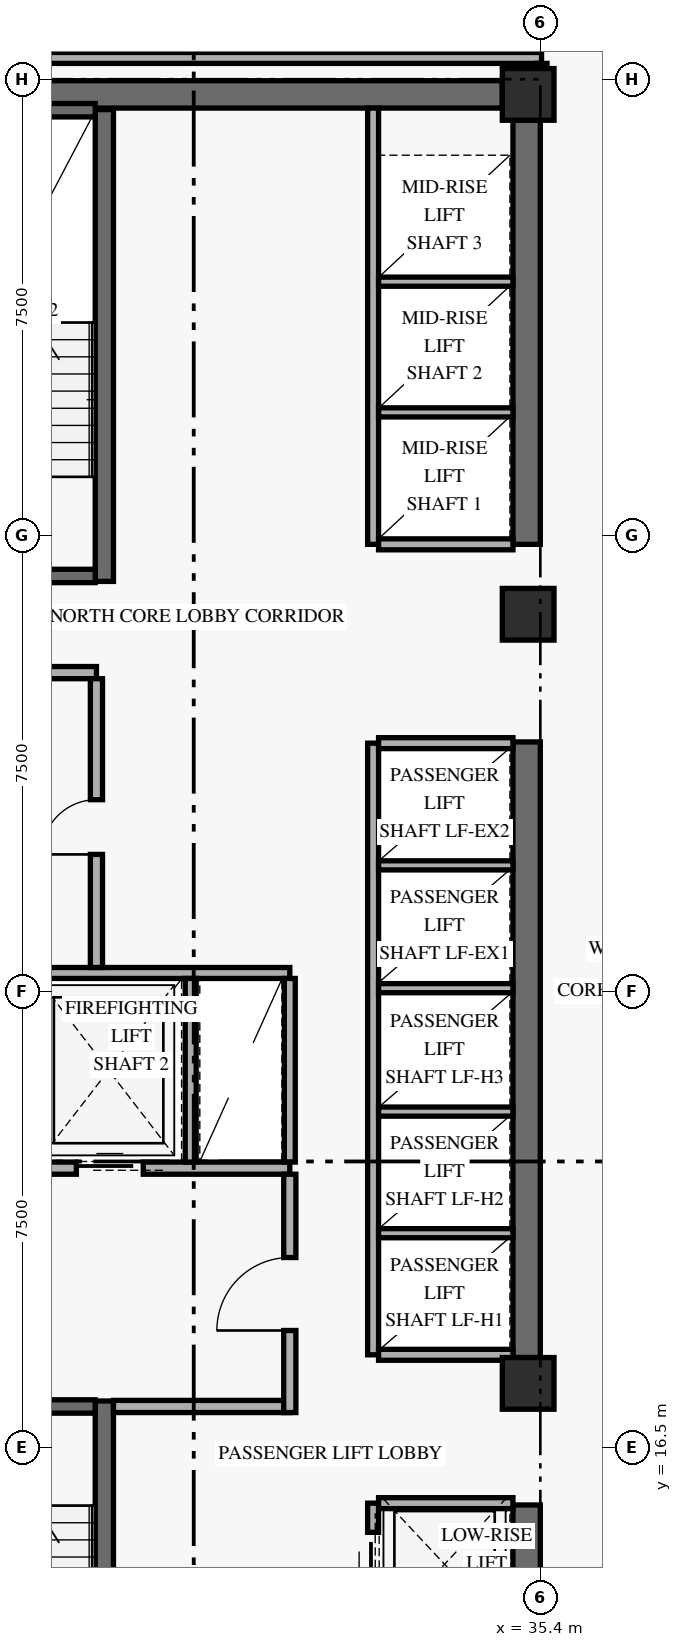
"""IFC4 building model, lengths in metres.
Left out: names, types, materials, properties, quantities, classifications, styles, units other than length and angle.
Written with IfcOpenShell. Run it as: python <this file> out.ifc"""

import sys

from ifc_helpers import new_model, si_unit, direction, frame, frame_2d, origin, origin_2d, place, context, subcontext, project, spatial, rectangle, extrude, element, fill, save


model = new_model("IFC4")
c1 = context("Model", 3, precision=1e-05, world=origin(), true_north=direction((0.0, 1.0)))
c2 = subcontext(c1, "Body", "Model", "MODEL_VIEW")
j1 = project(units=[si_unit("LENGTHUNIT", "METRE"), si_unit("PLANEANGLEUNIT", "RADIAN")], contexts=[c1])
p1 = place(None, origin())
s1 = spatial("IfcSite", under=j1, at=p1, CompositionType="ELEMENT")
p2 = place(p1, origin())
s2 = spatial("IfcBuilding", under=s1, at=p2, CompositionType="ELEMENT")
p3 = place(p2, frame((0.0, 0.0, 56.4)))
s3 = spatial("IfcBuildingStorey", under=s2, at=p3, CompositionType="ELEMENT", Elevation=56.4)
p4 = place(p3, frame((35.175, 9.675, 0.0), z_axis=(0.0, 0.0, 1.0), x_axis=(0.0, 1.0, 0.0)))
e1 = element("IfcWall", 1, at=p4, inside=s3, PredefinedType="SHEAR", context=c2, shape_type="SweptSolid", body=[
    extrude(rectangle(XDim=5.875, YDim=0.45, at=frame_2d((2.938, 0.0))), origin(), (0.0, 0.0, 1.0), 2.657),
])
p5 = place(p3, frame((35.175, 17.975, 0.0), z_axis=(0.0, 0.0, 1.0), x_axis=(0.0, 1.0, 0.0)))
e2 = element("IfcWall", 2, at=p5, inside=s3, PredefinedType="SHEAR", context=c2, shape_type="SweptSolid", body=[
    extrude(rectangle(XDim=10.125, YDim=0.45, at=frame_2d((5.062, 0.0))), origin(), (0.0, 0.0, 1.0), 2.657),
])
p6 = place(p3, frame((35.175, 31.35, 0.0), z_axis=(0.0, 0.0, 1.0), x_axis=(0.0, 1.0, 0.0)))
e3 = element("IfcWall", 3, at=p6, inside=s3, PredefinedType="SHEAR", context=c2, shape_type="SweptSolid", body=[
    extrude(rectangle(XDim=6.975, YDim=0.45, at=frame_2d((3.487, 0.0))), origin(), (0.0, 0.0, 1.0), 2.657),
])
p7 = place(p3, frame((24.625, 38.75, 0.0), z_axis=(0.0, 0.0, 1.0), x_axis=(1.0, 0.0, 0.0)))
e4 = element("IfcWall", 4, at=p7, inside=s3, PredefinedType="SHEAR", context=c2, shape_type="SweptSolid", body=[
    extrude(rectangle(XDim=10.15, YDim=0.45, at=frame_2d((5.075, 0.0))), origin(), (0.0, 0.0, 1.0), 3.35),
])
p8 = place(p3, frame((28.23, 9.5, 0.0), z_axis=(0.0, 0.0, 1.0), x_axis=(0.0, 1.0, 0.0)))
e5 = element("IfcWall", 5, at=p8, inside=s3, PredefinedType="SHEAR", context=c2, shape_type="SweptSolid", body=[
    extrude(rectangle(XDim=7.76, YDim=0.3, at=frame_2d((3.88, 0.0))), origin(), (0.0, 0.0, 1.0), 3.35),
])
p9 = place(p3, frame((24.92, 17.17, 0.0), z_axis=(0.0, 0.0, 1.0), x_axis=(1.0, 0.0, 0.0)))
e6 = element("IfcWall", 6, at=p9, inside=s3, PredefinedType="SHEAR", context=c2, shape_type="SweptSolid", body=[
    extrude(rectangle(XDim=3.16, YDim=0.22, at=frame_2d((1.58, 0.0))), origin(), (0.0, 0.0, 1.0), 3.35),
])
p10 = place(p9, frame((0.78, 0.0, 0.0)))
e7 = element("IfcOpeningElement", 7, at=p10, cuts=e6, PredefinedType="OPENING", context=c2, shape_type="SweptSolid", body=[
    extrude(rectangle(XDim=1.05, YDim=2.15, at=frame_2d((0.525, 1.075))), frame((0.0, 0.12, 0.0), z_axis=(0.0, -1.0, 0.0), x_axis=(1.0, 0.0, 0.0)), (0.0, 0.0, 1.0), 0.24),
])
p11 = place(p3, frame((28.23, 30.74, 0.0), z_axis=(0.0, 0.0, 1.0), x_axis=(0.0, 1.0, 0.0)))
e8 = element("IfcWall", 8, at=p11, inside=s3, PredefinedType="SHEAR", context=c2, shape_type="SweptSolid", body=[
    extrude(rectangle(XDim=7.76, YDim=0.3, at=frame_2d((3.88, 0.0))), origin(), (0.0, 0.0, 1.0), 3.35),
])
p12 = place(p3, frame((24.92, 30.83, 0.0), z_axis=(0.0, 0.0, 1.0), x_axis=(1.0, 0.0, 0.0)))
e9 = element("IfcWall", 9, at=p12, inside=s3, PredefinedType="SHEAR", context=c2, shape_type="SweptSolid", body=[
    extrude(rectangle(XDim=3.16, YDim=0.22, at=frame_2d((1.58, 0.0))), origin(), (0.0, 0.0, 1.0), 3.35),
])
p13 = place(p12, frame((0.78, 0.0, 0.0)))
e10 = element("IfcOpeningElement", 10, at=p13, cuts=e9, PredefinedType="OPENING", context=c2, shape_type="SweptSolid", body=[
    extrude(rectangle(XDim=1.05, YDim=2.15, at=frame_2d((0.525, 1.075))), frame((0.0, 0.12, 0.0), z_axis=(0.0, -1.0, 0.0), x_axis=(1.0, 0.0, 0.0)), (0.0, 0.0, 1.0), 0.24),
])
p14 = place(p3, frame((24.92, 38.49, 0.0), z_axis=(0.0, 0.0, 1.0), x_axis=(1.0, 0.0, 0.0)))
e11 = element("IfcWall", 11, at=p14, inside=s3, PredefinedType="SHEAR", context=c2, shape_type="SweptSolid", body=[
    extrude(rectangle(XDim=3.16, YDim=0.22, at=frame_2d((1.58, 0.0))), origin(), (0.0, 0.0, 1.0), 3.35),
])
for number, where, z_axis, x_axis in (
    (12, (35.2, 17.55, 0.0), (0.0, 0.0, 1.0), (1.0, 0.0, 0.0)),
    (13, (35.2, 30.2, 0.0), (0.0, 0.0, 1.0), (1.0, 0.0, 0.0)),
    (14, (35.2, 38.75, 0.0), (0.0, 0.0, 1.0), (1.0, 0.0, 0.0)),
):
    element("IfcColumn", number, at=place(p3, frame(where, z_axis=z_axis, x_axis=x_axis)), inside=s3, PredefinedType="COLUMN", context=c2, shape_type="SweptSolid", body=[
        extrude(rectangle(XDim=0.85, YDim=0.85, at=origin_2d()), origin(), (0.0, 0.0, 1.0), 3.6),
    ])
p15 = place(p3, frame((24.45, 21.09, 0.0), z_axis=(0.0, 0.0, 1.0), x_axis=(1.0, 0.0, 0.0)))
e15 = element("IfcWall", 15, at=p15, inside=s3, PredefinedType="STANDARD", context=c2, shape_type="SweptSolid", body=[
    extrude(rectangle(XDim=6.83, YDim=0.2, at=frame_2d((3.415, 0.0))), origin(), (0.0, 0.0, 1.0), 3.35),
])
p16 = place(p15, frame((0.72, 0.0, 0.0)))
e16 = element("IfcOpeningElement", 16, at=p16, cuts=e15, PredefinedType="OPENING", context=c2, shape_type="SweptSolid", body=[
    extrude(rectangle(XDim=1.1, YDim=2.2, at=frame_2d((0.55, 1.1))), frame((0.0, 0.11, 0.0), z_axis=(0.0, -1.0, 0.0), x_axis=(1.0, 0.0, 0.0)), (0.0, 0.0, 1.0), 0.22),
])
p17 = place(p15, frame((3.32, 0.0, 0.0)))
e17 = element("IfcOpeningElement", 17, at=p17, cuts=e15, PredefinedType="OPENING", context=c2, shape_type="SweptSolid", body=[
    extrude(rectangle(XDim=1.1, YDim=2.2, at=frame_2d((0.55, 1.1))), frame((0.0, 0.11, 0.0), z_axis=(0.0, -1.0, 0.0), x_axis=(1.0, 0.0, 0.0)), (0.0, 0.0, 1.0), 0.22),
])
p18 = place(p3, frame((28.38, 17.17, 0.0), z_axis=(0.0, 0.0, 1.0), x_axis=(1.0, 0.0, 0.0)))
e18 = element("IfcWall", 18, at=p18, inside=s3, PredefinedType="STANDARD", context=c2, shape_type="SweptSolid", body=[
    extrude(rectangle(XDim=2.9, YDim=0.2, at=frame_2d((1.45, 0.0))), origin(), (0.0, 0.0, 1.0), 3.35),
])
p19 = place(p3, frame((31.28, 17.07, 0.0), z_axis=(0.0, 0.0, 1.0), x_axis=(0.0, 1.0, 0.0)))
e19 = element("IfcWall", 19, at=p19, inside=s3, PredefinedType="STANDARD", context=c2, shape_type="SweptSolid", body=[
    extrude(rectangle(XDim=3.92, YDim=0.2, at=frame_2d((1.96, 0.0))), origin(), (0.0, 0.0, 1.0), 2.639),
])
p20 = place(p19, frame((1.35, 0.0, 0.0)))
e20 = element("IfcOpeningElement", 20, at=p20, cuts=e19, PredefinedType="OPENING", context=c2, shape_type="SweptSolid", body=[
    extrude(rectangle(XDim=1.2, YDim=2.15, at=frame_2d((0.6, 1.075))), frame((0.0, 0.11, 0.0), z_axis=(0.0, -1.0, 0.0), x_axis=(1.0, 0.0, 0.0)), (0.0, 0.0, 1.0), 0.22),
])
p21 = place(p3, frame((24.45, 24.3, 0.0), z_axis=(0.0, 0.0, 1.0), x_axis=(1.0, 0.0, 0.0)))
e21 = element("IfcWall", 21, at=p21, inside=s3, PredefinedType="STANDARD", context=c2, shape_type="SweptSolid", body=[
    extrude(rectangle(XDim=6.83, YDim=0.18, at=frame_2d((3.415, 0.0))), origin(), (0.0, 0.0, 1.0), 3.35),
])
for number, where, z_axis, x_axis in (
    (22, (29.65, 21.19, 0.0), (0.0, 0.0, 1.0), (0.0, 1.0, 0.0)),
    (23, (31.28, 21.19, 0.0), (0.0, 0.0, 1.0), (0.0, 1.0, 0.0)),
):
    element("IfcWall", number, at=place(p3, frame(where, z_axis=z_axis, x_axis=x_axis)), inside=s3, PredefinedType="STANDARD", context=c2, shape_type="SweptSolid", body=[
        extrude(rectangle(XDim=3.02, YDim=0.18, at=frame_2d((1.51, 0.0))), origin(), (0.0, 0.0, 1.0), 3.35),
    ])
p22 = place(p3, frame((24.45, 29.24, 0.0), z_axis=(0.0, 0.0, 1.0), x_axis=(1.0, 0.0, 0.0)))
e24 = element("IfcWall", 24, at=p22, inside=s3, PredefinedType="STANDARD", context=c2, shape_type="SweptSolid", body=[
    extrude(rectangle(XDim=3.65, YDim=0.2, at=frame_2d((1.825, 0.0))), origin(), (0.0, 0.0, 1.0), 3.35),
])
p23 = place(p3, frame((28.1, 24.39, 0.0), z_axis=(0.0, 0.0, 1.0), x_axis=(0.0, 1.0, 0.0)))
e25 = element("IfcWall", 25, at=p23, inside=s3, PredefinedType="STANDARD", context=c2, shape_type="SweptSolid", body=[
    extrude(rectangle(XDim=4.75, YDim=0.2, at=frame_2d((2.375, 0.0))), origin(), (0.0, 0.0, 1.0), 3.35),
])
p24 = place(p23, frame((1.86, 0.0, 0.0)))
e26 = element("IfcOpeningElement", 26, at=p24, cuts=e25, PredefinedType="OPENING", context=c2, shape_type="SweptSolid", body=[
    extrude(rectangle(XDim=0.9, YDim=2.1, at=frame_2d((0.45, 1.05))), frame((0.0, 0.11, 0.0), z_axis=(0.0, -1.0, 0.0), x_axis=(1.0, 0.0, 0.0)), (0.0, 0.0, 1.0), 0.22),
])
p25 = place(p3, frame((32.65, 9.5, 0.0), z_axis=(0.0, 0.0, 1.0), x_axis=(0.0, 1.0, 0.0)))
e27 = element("IfcWall", 27, at=p25, inside=s3, PredefinedType="STANDARD", context=c2, shape_type="SweptSolid", body=[
    extrude(rectangle(XDim=6.08, YDim=0.18, at=frame_2d((3.04, 0.0))), origin(), (0.0, 0.0, 1.0), 3.35),
])
p26 = place(p25, frame((0.55, 0.0, 0.0)))
e28 = element("IfcOpeningElement", 28, at=p26, cuts=e27, PredefinedType="OPENING", context=c2, shape_type="SweptSolid", body=[
    extrude(rectangle(XDim=1.05, YDim=2.2, at=frame_2d((0.525, 1.1))), frame((0.0, 0.1, 0.0), z_axis=(0.0, -1.0, 0.0), x_axis=(1.0, 0.0, 0.0)), (0.0, 0.0, 1.0), 0.2),
])
p27 = place(p25, frame((2.55, 0.0, 0.0)))
e29 = element("IfcOpeningElement", 29, at=p27, cuts=e27, PredefinedType="OPENING", context=c2, shape_type="SweptSolid", body=[
    extrude(rectangle(XDim=1.05, YDim=2.2, at=frame_2d((0.525, 1.1))), frame((0.0, 0.1, 0.0), z_axis=(0.0, -1.0, 0.0), x_axis=(1.0, 0.0, 0.0)), (0.0, 0.0, 1.0), 0.2),
])
p28 = place(p25, frame((4.55, 0.0, 0.0)))
e30 = element("IfcOpeningElement", 30, at=p28, cuts=e27, PredefinedType="OPENING", context=c2, shape_type="SweptSolid", body=[
    extrude(rectangle(XDim=1.05, YDim=2.2, at=frame_2d((0.525, 1.1))), frame((0.0, 0.1, 0.0), z_axis=(0.0, -1.0, 0.0), x_axis=(1.0, 0.0, 0.0)), (0.0, 0.0, 1.0), 0.2),
])
p29 = place(p3, frame((32.74, 15.58, 0.0), z_axis=(0.0, 0.0, 1.0), x_axis=(1.0, 0.0, 0.0)))
e31 = element("IfcWall", 31, at=p29, inside=s3, PredefinedType="STANDARD", context=c2, shape_type="SweptSolid", body=[
    extrude(rectangle(XDim=2.21, YDim=0.18, at=frame_2d((1.105, 0.0))), origin(), (0.0, 0.0, 1.0), 3.35),
])
p30 = place(p3, frame((32.65, 18.02, 0.0), z_axis=(0.0, 0.0, 1.0), x_axis=(0.0, 1.0, 0.0)))
e32 = element("IfcWall", 32, at=p30, inside=s3, PredefinedType="STANDARD", context=c2, shape_type="SweptSolid", body=[
    extrude(rectangle(XDim=10.06, YDim=0.18, at=frame_2d((5.03, 0.0))), origin(), (0.0, 0.0, 1.0), 3.35),
])
for number, where, z_axis, x_axis in (
    (33, (32.74, 18.02, 0.0), (0.0, 0.0, 1.0), (1.0, 0.0, 0.0)),
    (34, (32.74, 28.08, 0.0), (0.0, 0.0, 1.0), (1.0, 0.0, 0.0)),
):
    element("IfcWall", number, at=place(p3, frame(where, z_axis=z_axis, x_axis=x_axis)), inside=s3, PredefinedType="STANDARD", context=c2, shape_type="SweptSolid", body=[
        extrude(rectangle(XDim=2.21, YDim=0.18, at=frame_2d((1.105, 0.0))), origin(), (0.0, 0.0, 1.0), 3.35),
    ])
for number, where, z_axis, x_axis in (
    (35, (32.74, 20.02, 0.0), (0.0, 0.0, 1.0), (1.0, 0.0, 0.0)),
    (36, (32.74, 22.02, 0.0), (0.0, 0.0, 1.0), (1.0, 0.0, 0.0)),
    (37, (32.74, 24.05, 0.0), (0.0, 0.0, 1.0), (1.0, 0.0, 0.0)),
    (38, (32.74, 26.07, 0.0), (0.0, 0.0, 1.0), (1.0, 0.0, 0.0)),
):
    element("IfcWall", number, at=place(p3, frame(where, z_axis=z_axis, x_axis=x_axis)), inside=s3, PredefinedType="STANDARD", context=c2, shape_type="SweptSolid", body=[
        extrude(rectangle(XDim=2.21, YDim=0.15, at=frame_2d((1.105, 0.0))), origin(), (0.0, 0.0, 1.0), 3.35),
    ])
p31 = place(p3, frame((32.65, 31.35, 0.0), z_axis=(0.0, 0.0, 1.0), x_axis=(0.0, 1.0, 0.0)))
e39 = element("IfcWall", 39, at=p31, inside=s3, PredefinedType="STANDARD", context=c2, shape_type="SweptSolid", body=[
    extrude(rectangle(XDim=7.175, YDim=0.18, at=frame_2d((3.587, 0.0))), origin(), (0.0, 0.0, 1.0), 3.35),
])
p32 = place(p3, frame((32.74, 31.35, 0.0), z_axis=(0.0, 0.0, 1.0), x_axis=(1.0, 0.0, 0.0)))
e40 = element("IfcWall", 40, at=p32, inside=s3, PredefinedType="STANDARD", context=c2, shape_type="SweptSolid", body=[
    extrude(rectangle(XDim=2.21, YDim=0.18, at=frame_2d((1.105, 0.0))), origin(), (0.0, 0.0, 1.0), 3.35),
])
for number, where, z_axis, x_axis in (
    (41, (32.74, 33.52, 0.0), (0.0, 0.0, 1.0), (1.0, 0.0, 0.0)),
    (42, (32.74, 35.67, 0.0), (0.0, 0.0, 1.0), (1.0, 0.0, 0.0)),
):
    element("IfcWall", number, at=place(p3, frame(where, z_axis=z_axis, x_axis=x_axis)), inside=s3, PredefinedType="STANDARD", context=c2, shape_type="SweptSolid", body=[
        extrude(rectangle(XDim=2.21, YDim=0.15, at=frame_2d((1.105, 0.0))), origin(), (0.0, 0.0, 1.0), 3.35),
    ])
p33 = place(p3, frame((23.75, 39.35, 0.0), z_axis=(0.0, 0.0, 1.0), x_axis=(1.0, 0.0, 0.0)))
e43 = element("IfcWall", 43, at=p33, inside=s3, PredefinedType="STANDARD", context=c2, shape_type="SweptSolid", body=[
    extrude(rectangle(XDim=11.67, YDim=0.18, at=frame_2d((5.835, 0.0))), origin(), (0.0, 0.0, 1.0), 2.639),
])
p34 = place(p3, frame((35.42, 38.75, 0.0), z_axis=(0.0, 0.0, 1.0), x_axis=(0.0, 1.0, 0.0)))
e44 = element("IfcWall", 44, at=p34, inside=s3, PredefinedType="STANDARD", context=c2, shape_type="SweptSolid", body=[
    extrude(rectangle(XDim=0.51, YDim=0.18, at=frame_2d((0.255, 0.0))), origin(), (0.0, 0.0, 1.0), 3.35),
])
p35 = place(p17, origin())
e45 = element("IfcDoor", 45, at=p35, inside=s3, OperationType="SLIDING_TO_LEFT", PredefinedType="DOOR", context=c2, shape_type="SweptSolid", body=[
    extrude(rectangle(XDim=1.1, YDim=2.2, at=frame_2d((0.55, 1.1))), frame((0.0, 0.025, 0.0), z_axis=(0.0, -1.0, 0.0), x_axis=(1.0, 0.0, 0.0)), (0.0, 0.0, 1.0), 0.05),
])
fill(e17, e45)
p36 = place(p20, origin())
e46 = element("IfcDoor", 46, at=p36, inside=s3, OperationType="SINGLE_SWING_LEFT", PredefinedType="DOOR", context=c2, shape_type="SweptSolid", body=[
    extrude(rectangle(XDim=1.2, YDim=2.15, at=frame_2d((0.6, 1.075))), frame((0.0, 0.025, 0.0), z_axis=(0.0, -1.0, 0.0), x_axis=(1.0, 0.0, 0.0)), (0.0, 0.0, 1.0), 0.05),
])
fill(e20, e46)
p37 = place(p24, origin())
e47 = element("IfcDoor", 47, at=p37, inside=s3, OperationType="SINGLE_SWING_LEFT", PredefinedType="DOOR", context=c2, shape_type="SweptSolid", body=[
    extrude(rectangle(XDim=0.9, YDim=2.1, at=frame_2d((0.45, 1.05))), frame((0.0, 0.025, 0.0), z_axis=(0.0, -1.0, 0.0), x_axis=(1.0, 0.0, 0.0)), (0.0, 0.0, 1.0), 0.05),
])
fill(e26, e47)
p38 = place(p28, origin())
e48 = element("IfcDoor", 48, at=p38, inside=s3, OperationType="SLIDING_TO_LEFT", PredefinedType="DOOR", context=c2, shape_type="SweptSolid", body=[
    extrude(rectangle(XDim=1.05, YDim=2.2, at=frame_2d((0.525, 1.1))), frame((0.0, 0.025, 0.0), z_axis=(0.0, -1.0, 0.0), x_axis=(1.0, 0.0, 0.0)), (0.0, 0.0, 1.0), 0.05),
])
fill(e30, e48)
save(model, sys.argv[1])
